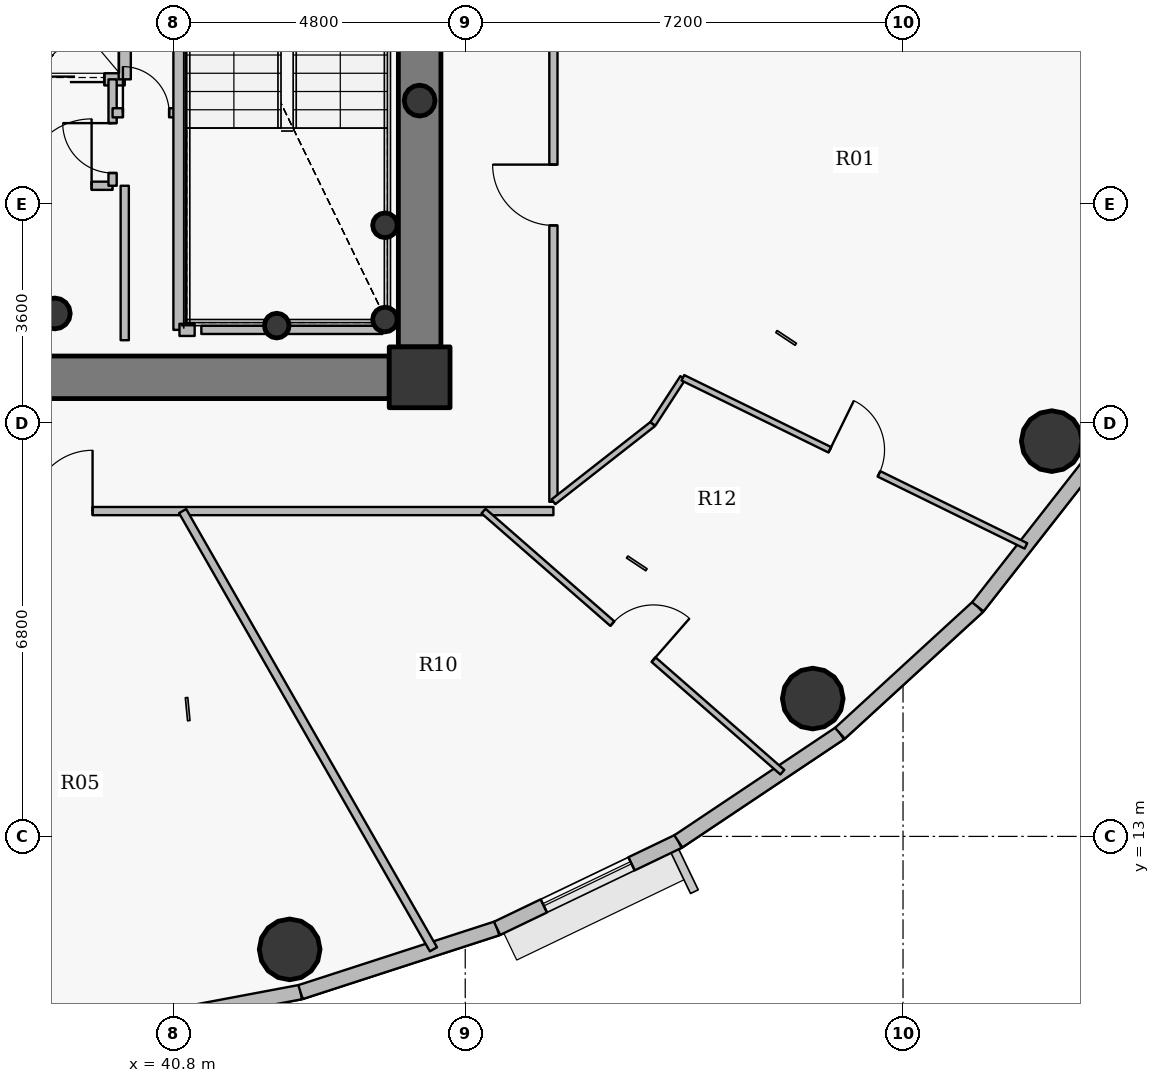
"""IFC4 building model, lengths in metres.
Left out: names, types, materials, properties, quantities, classifications, styles, units other than length and angle.
Written with IfcOpenShell. Run it as: python <this file> out.ifc"""

import sys

from ifc_helpers import new_model, si_unit, direction, frame, frame_2d, origin, origin_2d, place, context, subcontext, project, spatial, rectangle, hollow_circle, extrude, source, transform, mapped, element, fill, save


model = new_model("IFC4")
c1 = context("Model", 3, precision=1e-05, world=origin(), true_north=direction((0.0, 1.0)))
c2 = subcontext(c1, "Body", "Model", "MODEL_VIEW")
j1 = project(units=[si_unit("LENGTHUNIT", "METRE"), si_unit("PLANEANGLEUNIT", "RADIAN")], contexts=[c1])
p1 = place(None, origin())
s1 = spatial("IfcSite", under=j1, at=p1, CompositionType="ELEMENT")
p2 = place(p1, origin())
s2 = spatial("IfcBuilding", under=s1, at=p2, CompositionType="ELEMENT")
p3 = place(p2, frame((0.0, 0.0, 273.0)))
s3 = spatial("IfcBuildingStorey", under=s2, at=p3, CompositionType="ELEMENT", Elevation=273.0)
p4 = place(p3, frame((44.85, 20.55, 0.0), z_axis=(0.0, 0.0, 1.0), x_axis=(1.0, 0.0, 0.0)))
e1 = element("IfcColumn", 1, at=p4, inside=s3, PredefinedType="COLUMN", context=c2, shape_type="SweptSolid", body=[
    extrude(rectangle(XDim=1.0, YDim=1.0, at=origin_2d()), origin(), (0.0, 0.0, 1.0), 3.75),
])
p5 = place(p3, frame((38.85, 21.6, 0.0), z_axis=(0.0, 0.0, 1.0), x_axis=(1.0, 0.0, 0.0)))
e2 = element("IfcColumn", 2, at=p5, inside=s3, PredefinedType="COLUMN", context=c2, shape_type="SweptSolid", body=[
    extrude(hollow_circle(Radius=0.254, WallThickness=0.02, at=origin_2d()), origin(), (0.0, 0.0, 1.0), 3.75),
])
for number, where, z_axis, x_axis in (
    (3, (44.28, 21.5, 0.0), (0.0, 0.0, 1.0), (1.0, 0.0, 0.0)),
    (4, (44.28, 23.05, 0.0), (0.0, 0.0, 1.0), (1.0, 0.0, 0.0)),
    (5, (42.5, 21.4, 0.0), (0.0, 0.0, 1.0), (1.0, 0.0, 0.0)),
):
    element("IfcColumn", number, at=place(p3, frame(where, z_axis=z_axis, x_axis=x_axis)), inside=s3, PredefinedType="COLUMN", context=c2, shape_type="SweptSolid", body=[
        extrude(hollow_circle(Radius=0.203, WallThickness=0.016, at=origin_2d()), origin(), (0.0, 0.0, 1.0), 3.75),
    ])
p6 = place(p3, frame((44.85, 32.95, 0.0), z_axis=(0.0, 0.0, 1.0), x_axis=(0.0, -1.0, 0.0)))
e6 = element("IfcWall", 6, at=p6, inside=s3, PredefinedType="SHEAR", context=c2, shape_type="SweptSolid", body=[
    extrude(rectangle(XDim=11.9, YDim=0.7, at=frame_2d((5.95, 0.0))), origin(), (0.0, 0.0, 1.0), 3.05),
])
p7 = place(p3, frame((44.35, 20.55, 0.0), z_axis=(0.0, 0.0, 1.0), x_axis=(-1.0, 0.0, 0.0)))
e7 = element("IfcWall", 7, at=p7, inside=s3, PredefinedType="SHEAR", context=c2, shape_type="SweptSolid", body=[
    extrude(rectangle(XDim=16.7, YDim=0.7, at=frame_2d((8.35, 0.0))), origin(), (0.0, 0.0, 1.0), 3.05),
])
p8 = place(p7, frame((12.925, 0.0, 0.0)))
e8 = element("IfcOpeningElement", 8, at=p8, cuts=e7, PredefinedType="OPENING", context=c2, shape_type="SweptSolid", body=[
    extrude(rectangle(XDim=1.15, YDim=2.15, at=origin_2d()), frame((0.575, 0.36, 1.075), z_axis=(0.0, -1.0, 0.0), x_axis=(1.0, 0.0, 0.0)), (0.0, 0.0, 1.0), 0.72),
])
p9 = place(p7, frame((9.1, 0.0, 0.0)))
e9 = element("IfcOpeningElement", 9, at=p9, cuts=e7, PredefinedType="OPENING", context=c2, shape_type="SweptSolid", body=[
    extrude(rectangle(XDim=1.15, YDim=2.15, at=origin_2d()), frame((0.575, 0.36, 1.075), z_axis=(0.0, -1.0, 0.0), x_axis=(1.0, 0.0, 0.0)), (0.0, 0.0, 1.0), 0.72),
])
for number, where, z_axis, x_axis in (
    (10, (42.712, 11.142, 0.0), (0.0, 0.0, 1.0), (1.0, 0.0, 0.0)),
    (11, (51.315, 15.267, 0.0), (0.0, 0.0, 1.0), (1.0, 0.0, 0.0)),
    (12, (55.246, 19.5, 0.0), (0.0, 0.0, 1.0), (1.0, 0.0, 0.0)),
):
    element("IfcColumn", number, at=place(p3, frame(where, z_axis=z_axis, x_axis=x_axis)), inside=s3, PredefinedType="COLUMN", context=c2, shape_type="SweptSolid", body=[
        extrude(hollow_circle(Radius=0.5, WallThickness=0.032, at=origin_2d()), origin(), (0.0, 0.0, 1.0), 3.75),
    ])
p10 = place(p3, frame((44.85, 25.1, 0.0), z_axis=(0.0, 0.0, 1.0), x_axis=(1.0, 0.0, 0.0)))
e13 = element("IfcColumn", 13, at=p10, inside=s3, PredefinedType="COLUMN", context=c2, shape_type="SweptSolid", body=[
    extrude(hollow_circle(Radius=0.254, WallThickness=0.02, at=origin_2d()), origin(), (0.0, 0.0, 1.0), 3.75),
])
p11 = place(p3, frame((42.891, 10.44, 0.0), z_axis=(0.0, 0.0, 1.0), x_axis=(-0.982782655757, -0.184765395959, 0.0)))
e14 = element("IfcWall", 14, at=p11, inside=s3, PredefinedType="SOLIDWALL", context=c2, shape_type="SweptSolid", body=[
    extrude(rectangle(XDim=3.462, YDim=0.24, at=frame_2d((1.731, 0.0))), origin(), (0.0, 0.0, 1.0), 3.5),
])
p12 = place(p3, frame((46.123, 11.488, 0.0), z_axis=(0.0, 0.0, 1.0), x_axis=(-0.95123136723, -0.308478339592, 0.0)))
e15 = element("IfcWall", 15, at=p12, inside=s3, PredefinedType="SOLIDWALL", context=c2, shape_type="SweptSolid", body=[
    extrude(rectangle(XDim=3.398, YDim=0.24, at=frame_2d((1.699, 0.0))), origin(), (0.0, 0.0, 1.0), 3.5),
])
p13 = place(p3, frame((49.104, 12.918, 0.0), z_axis=(0.0, 0.0, 1.0), x_axis=(-0.901573741254, -0.43262546051, 0.0)))
e16 = element("IfcWall", 16, at=p13, inside=s3, PredefinedType="SOLIDWALL", context=c2, shape_type="SweptSolid", body=[
    extrude(rectangle(XDim=3.307, YDim=0.24, at=frame_2d((1.653, 0.0))), origin(), (0.0, 0.0, 1.0), 3.5),
])
p14 = place(p13, frame((0.854, 0.0, 0.9)))
e17 = element("IfcOpeningElement", 17, at=p14, cuts=e16, PredefinedType="OPENING", context=c2, shape_type="SweptSolid", body=[
    extrude(rectangle(XDim=1.6, YDim=1.75, at=origin_2d()), frame((0.8, 0.13, 0.875), z_axis=(0.0, -1.0, 0.0), x_axis=(1.0, 0.0, 0.0)), (0.0, 0.0, 1.0), 0.26),
])
p15 = place(p3, frame((51.762, 14.696, 0.0), z_axis=(0.0, 0.0, 1.0), x_axis=(-0.831250592635, -0.55589787933, 0.0)))
e18 = element("IfcWall", 18, at=p15, inside=s3, PredefinedType="SOLIDWALL", context=c2, shape_type="SweptSolid", body=[
    extrude(rectangle(XDim=3.197, YDim=0.24, at=frame_2d((1.599, 0.0))), origin(), (0.0, 0.0, 1.0), 3.5),
])
p16 = place(p3, frame((54.03, 16.775, 0.0), z_axis=(0.0, 0.0, 1.0), x_axis=(-0.737068506972, -0.675818034703, 0.0)))
e19 = element("IfcWall", 19, at=p16, inside=s3, PredefinedType="SOLIDWALL", context=c2, shape_type="SweptSolid", body=[
    extrude(rectangle(XDim=3.077, YDim=0.24, at=frame_2d((1.539, 0.0))), origin(), (0.0, 0.0, 1.0), 3.5),
])
p17 = place(p3, frame((55.854, 19.105, 0.0), z_axis=(0.0, 0.0, 1.0), x_axis=(-0.616337186556, -0.787482363275, 0.0)))
e20 = element("IfcWall", 20, at=p17, inside=s3, PredefinedType="SOLIDWALL", context=c2, shape_type="SweptSolid", body=[
    extrude(rectangle(XDim=2.958, YDim=0.24, at=frame_2d((1.479, 0.0))), origin(), (0.0, 0.0, 1.0), 3.5),
])
p18 = place(p3, frame((35.45, 23.7, 0.0), z_axis=(0.0, 0.0, 1.0), x_axis=(1.0, 0.0, 0.0)))
e21 = element("IfcWall", 21, at=p18, inside=s3, PredefinedType="PARTITIONING", context=c2, shape_type="SweptSolid", body=[
    extrude(rectangle(XDim=4.35, YDim=0.135, at=frame_2d((2.175, 0.0))), origin(), (0.0, 0.0, 1.0), 3.085),
])
p19 = place(p18, frame((2.905, 0.0, 0.0)))
e22 = element("IfcOpeningElement", 22, at=p19, cuts=e21, PredefinedType="OPENING", context=c2, shape_type="SweptSolid", body=[
    extrude(rectangle(XDim=1.1, YDim=2.15, at=origin_2d()), frame((0.55, 0.078, 1.075), z_axis=(0.0, -1.0, 0.0), x_axis=(1.0, 0.0, 0.0)), (0.0, 0.0, 1.0), 0.155),
])
p20 = place(p3, frame((35.45, 25.45, 0.0), z_axis=(0.0, 0.0, 1.0), x_axis=(1.0, 0.0, 0.0)))
e23 = element("IfcWall", 23, at=p20, inside=s3, PredefinedType="PARTITIONING", context=c2, shape_type="SweptSolid", body=[
    extrude(rectangle(XDim=4.55, YDim=0.2, at=frame_2d((2.275, 0.0))), origin(), (0.0, 0.0, 1.0), 3.085),
])
p21 = place(p20, frame((0.25, 0.0, 0.0)))
e24 = element("IfcOpeningElement", 24, at=p21, cuts=e23, PredefinedType="OPENING", context=c2, shape_type="SweptSolid", body=[
    extrude(rectangle(XDim=1.05, YDim=2.15, at=origin_2d()), frame((0.525, 0.11, 1.075), z_axis=(0.0, -1.0, 0.0), x_axis=(1.0, 0.0, 0.0)), (0.0, 0.0, 1.0), 0.22),
])
p22 = place(p20, frame((1.745, 0.0, 0.0)))
e25 = element("IfcOpeningElement", 25, at=p22, cuts=e23, PredefinedType="OPENING", context=c2, shape_type="SweptSolid", body=[
    extrude(rectangle(XDim=1.05, YDim=2.15, at=origin_2d()), frame((0.525, 0.11, 1.075), z_axis=(0.0, -1.0, 0.0), x_axis=(1.0, 0.0, 0.0)), (0.0, 0.0, 1.0), 0.22),
])
p23 = place(p20, frame((3.165, 0.0, 0.0)))
e26 = element("IfcOpeningElement", 26, at=p23, cuts=e23, PredefinedType="OPENING", context=c2, shape_type="SweptSolid", body=[
    extrude(rectangle(XDim=1.05, YDim=2.15, at=origin_2d()), frame((0.525, 0.11, 1.075), z_axis=(0.0, -1.0, 0.0), x_axis=(1.0, 0.0, 0.0)), (0.0, 0.0, 1.0), 0.22),
])
p24 = place(p3, frame((36.95, 18.35, 0.0), z_axis=(0.0, 0.0, 1.0), x_axis=(1.0, 0.0, 0.0)))
e27 = element("IfcWall", 27, at=p24, inside=s3, PredefinedType="PARTITIONING", context=c2, shape_type="SweptSolid", body=[
    extrude(rectangle(XDim=10.1, YDim=0.135, at=frame_2d((5.05, 0.0))), origin(), (0.0, 0.0, 1.0), 3.035),
])
p25 = place(p24, frame((1.521, 0.0, 0.0)))
e28 = element("IfcOpeningElement", 28, at=p25, cuts=e27, PredefinedType="OPENING", context=c2, shape_type="SweptSolid", body=[
    extrude(rectangle(XDim=1.0, YDim=2.15, at=origin_2d()), frame((0.5, 0.078, 1.075), z_axis=(0.0, -1.0, 0.0), x_axis=(1.0, 0.0, 0.0)), (0.0, 0.0, 1.0), 0.155),
])
p26 = place(p3, frame((39.8, 23.7, 0.0), z_axis=(0.0, 0.0, 1.0), x_axis=(0.0, 1.0, 0.0)))
e29 = element("IfcWall", 29, at=p26, inside=s3, PredefinedType="PARTITIONING", context=c2, shape_type="SweptSolid", body=[
    extrude(rectangle(XDim=1.75, YDim=0.135, at=frame_2d((0.875, 0.0))), origin(), (0.0, 0.0, 1.0), 3.5),
])
p27 = place(p26, frame((0.21, 0.0, 0.0)))
e30 = element("IfcOpeningElement", 30, at=p27, cuts=e29, PredefinedType="OPENING", context=c2, shape_type="SweptSolid", body=[
    extrude(rectangle(XDim=0.82, YDim=2.1, at=origin_2d()), frame((0.41, 0.078, 1.05), z_axis=(0.0, -1.0, 0.0), x_axis=(1.0, 0.0, 0.0)), (0.0, 0.0, 1.0), 0.155),
])
p28 = place(p3, frame((39.8, 24.9, 0.0), z_axis=(0.0, 0.0, 1.0), x_axis=(1.0, 0.0, 0.0)))
e31 = element("IfcWall", 31, at=p28, inside=s3, PredefinedType="PARTITIONING", context=c2, shape_type="SweptSolid", body=[
    extrude(rectangle(XDim=1.1, YDim=0.15, at=frame_2d((0.55, 0.0))), origin(), (0.0, 0.0, 1.0), 3.5),
])
p29 = place(p28, frame((0.17, 0.0, 0.0)))
e32 = element("IfcOpeningElement", 32, at=p29, cuts=e31, PredefinedType="OPENING", context=c2, shape_type="SweptSolid", body=[
    extrude(rectangle(XDim=0.76, YDim=2.1, at=origin_2d()), frame((0.38, 0.085, 1.05), z_axis=(0.0, -1.0, 0.0), x_axis=(1.0, 0.0, 0.0)), (0.0, 0.0, 1.0), 0.17),
])
p30 = place(p3, frame((40.0, 25.45, 0.0), z_axis=(0.0, 0.0, 1.0), x_axis=(0.0, 1.0, 0.0)))
e33 = element("IfcWall", 33, at=p30, inside=s3, PredefinedType="PARTITIONING", context=c2, shape_type="SweptSolid", body=[
    extrude(rectangle(XDim=4.4, YDim=0.2, at=frame_2d((2.2, 0.0))), origin(), (0.0, 0.0, 1.0), 3.5),
])
p31 = place(p3, frame((40.9, 21.33, 0.0), z_axis=(0.0, 0.0, 1.0), x_axis=(0.0, 1.0, 0.0)))
e34 = element("IfcWall", 34, at=p31, inside=s3, PredefinedType="PARTITIONING", context=c2, shape_type="SweptSolid", body=[
    extrude(rectangle(XDim=5.91, YDim=0.2, at=frame_2d((2.955, 0.0))), origin(), (0.0, 0.0, 1.0), 3.035),
])
p32 = place(p3, frame((40.9, 21.33, 0.0), z_axis=(0.0, 0.0, 1.0), x_axis=(1.0, 0.0, 0.0)))
e35 = element("IfcWall", 35, at=p32, inside=s3, PredefinedType="PARTITIONING", context=c2, shape_type="SweptSolid", body=[
    extrude(rectangle(XDim=0.25, YDim=0.2, at=frame_2d((0.125, 0.0))), origin(), (0.0, 0.0, 1.0), 3.035),
])
p33 = place(p3, frame((40.952, 18.35, 0.0), z_axis=(0.0, 0.0, 1.0), x_axis=(0.496803688517, -0.867862947173, 0.0)))
e36 = element("IfcWall", 36, at=p33, inside=s3, PredefinedType="PARTITIONING", context=c2, shape_type="SweptSolid", body=[
    extrude(rectangle(XDim=8.304, YDim=0.135, at=frame_2d((4.152, 0.0))), origin(), (0.0, 0.0, 1.0), 2.985),
])
p34 = place(p3, frame((45.901, 18.35, 0.0), z_axis=(0.0, 0.0, 1.0), x_axis=(0.753056223084, -0.657956172457, 0.0)))
e37 = element("IfcWall", 37, at=p34, inside=s3, PredefinedType="PARTITIONING", context=c2, shape_type="SweptSolid", body=[
    extrude(rectangle(XDim=6.526, YDim=0.1, at=frame_2d((3.263, 0.0))), origin(), (0.0, 0.0, 1.0), 2.985),
])
p35 = place(p34, frame((2.813, 0.0, 0.0)))
e38 = element("IfcOpeningElement", 38, at=p35, cuts=e37, PredefinedType="OPENING", context=c2, shape_type="SweptSolid", body=[
    extrude(rectangle(XDim=0.9, YDim=2.1, at=origin_2d()), frame((0.45, 0.06, 1.05), z_axis=(0.0, -1.0, 0.0), x_axis=(1.0, 0.0, 0.0)), (0.0, 0.0, 1.0), 0.12),
])
p36 = place(p3, frame((47.05, 18.503, 0.0), z_axis=(0.0, 0.0, 1.0), x_axis=(0.0, 1.0, 0.0)))
e39 = element("IfcWall", 39, at=p36, inside=s3, PredefinedType="PARTITIONING", context=c2, shape_type="SweptSolid", body=[
    extrude(rectangle(XDim=17.147, YDim=0.135, at=frame_2d((8.574, 0.0))), origin(), (0.0, 0.0, 1.0), 3.035),
])
p37 = place(p36, frame((4.545, 0.0, 0.0)))
e40 = element("IfcOpeningElement", 40, at=p37, cuts=e39, PredefinedType="OPENING", context=c2, shape_type="SweptSolid", body=[
    extrude(rectangle(XDim=1.0, YDim=2.15, at=origin_2d()), frame((0.5, 0.078, 1.075), z_axis=(0.0, -1.0, 0.0), x_axis=(1.0, 0.0, 0.0)), (0.0, 0.0, 1.0), 0.155),
])
p38 = place(p3, frame((47.05, 18.503, 0.0), z_axis=(0.0, 0.0, 1.0), x_axis=(0.787328855274, 0.616533270516, 0.0)))
e41 = element("IfcWall", 41, at=p38, inside=s3, PredefinedType="PARTITIONING", context=c2, shape_type="SweptSolid", body=[
    extrude(rectangle(XDim=2.077, YDim=0.1, at=frame_2d((1.039, 0.0))), origin(), (0.0, 0.0, 1.0), 3.035),
])
p39 = place(p3, frame((48.685, 19.783, 0.0), z_axis=(0.0, 0.0, 1.0), x_axis=(0.545519027777, 0.838098437138, 0.0)))
e42 = element("IfcWall", 42, at=p39, inside=s3, PredefinedType="PARTITIONING", context=c2, shape_type="SweptSolid", body=[
    extrude(rectangle(XDim=0.905, YDim=0.1, at=frame_2d((0.453, 0.0))), origin(), (0.0, 0.0, 1.0), 3.5),
])
p40 = place(p3, frame((49.179, 20.542, 0.0), z_axis=(0.0, 0.0, 1.0), x_axis=(0.89799659679, -0.440002400167, 0.0)))
e43 = element("IfcWall", 43, at=p40, inside=s3, PredefinedType="PARTITIONING", context=c2, shape_type="SweptSolid", body=[
    extrude(rectangle(XDim=6.283, YDim=0.1, at=frame_2d((3.141, 0.0))), origin(), (0.0, 0.0, 1.0), 2.985),
])
p41 = place(p40, frame((2.691, 0.0, 0.0)))
e44 = element("IfcOpeningElement", 44, at=p41, cuts=e43, PredefinedType="OPENING", context=c2, shape_type="SweptSolid", body=[
    extrude(rectangle(XDim=0.9, YDim=2.1, at=origin_2d()), frame((0.45, 0.06, 1.05), z_axis=(0.0, -1.0, 0.0), x_axis=(1.0, 0.0, 0.0)), (0.0, 0.0, 1.0), 0.12),
])
p42 = place(p3, frame((44.24, 21.33, 0.0), z_axis=(0.0, 0.0, 1.0), x_axis=(-1.0, 0.0, 0.0)))
e45 = element("IfcWall", 45, at=p42, inside=s3, PredefinedType="PARTITIONING", context=c2, shape_type="SweptSolid", body=[
    extrude(rectangle(XDim=2.98, YDim=0.135, at=frame_2d((1.49, 0.0))), origin(), (0.0, 0.0, 1.0), 3.035),
])
p43 = place(p3, frame((40.0, 23.7, 0.0), z_axis=(0.0, 0.0, 1.0), x_axis=(0.0, -1.0, 0.0)))
e46 = element("IfcWall", 46, at=p43, inside=s3, PredefinedType="PARTITIONING", context=c2, shape_type="SweptSolid", body=[
    extrude(rectangle(XDim=2.54, YDim=0.135, at=frame_2d((1.27, 0.0))), origin(), (0.0, 0.0, 1.0), 3.035),
])
p44 = place(p3, frame((44.36, 20.2, 0.0), z_axis=(0.0, 0.0, 1.0), x_axis=(1.0, 0.0, 0.0)))
e47 = element("IfcWall", 47, at=p44, inside=s3, PredefinedType="PARTITIONING", context=c2, shape_type="SweptSolid", body=[
    extrude(rectangle(XDim=0.84, YDim=0.135, at=frame_2d((0.42, 0.0))), origin(), (0.0, 0.0, 1.0), 3.035),
])
p45 = place(p3, frame((45.2, 20.508, 0.0), z_axis=(0.0, 0.0, 1.0), x_axis=(0.0, 1.0, 0.0)))
e48 = element("IfcWall", 48, at=p45, inside=s3, PredefinedType="PARTITIONING", context=c2, shape_type="SweptSolid", body=[
    extrude(rectangle(XDim=0.532, YDim=0.135, at=frame_2d((0.266, 0.0))), origin(), (0.0, 0.0, 1.0), 3.5),
])
m1 = source(origin(), c2, "Body", "SweptSolid", [
    extrude(rectangle(XDim=1.6, YDim=1.75, at=origin_2d()), frame((0.8, 0.03, 0.875), z_axis=(0.0, -1.0, 0.0), x_axis=(1.0, 0.0, 0.0)), (0.0, 0.0, 1.0), 0.06),
])
p46 = place(p14, origin())
e49 = element("IfcWindow", 49, at=p46, inside=s3, PartitioningType="DOUBLE_PANEL_VERTICAL", PredefinedType="WINDOW", context=c2, shape_type="MappedRepresentation", body=[
    mapped(m1, transform((0.0, 0.0, 0.0), x_axis=(1.0, 0.0, 0.0), y_axis=(0.0, 1.0, 0.0), z_axis=(0.0, 0.0, 1.0), scale=1.0)),
])
fill(e17, e49)
m2 = source(origin(), c2, "Body", "SweptSolid", [
    extrude(rectangle(XDim=1.05, YDim=2.15, at=origin_2d()), frame((0.525, 0.025, 1.075), z_axis=(0.0, -1.0, 0.0), x_axis=(1.0, 0.0, 0.0)), (0.0, 0.0, 1.0), 0.05),
])
p47 = place(p23, origin())
e50 = element("IfcDoor", 50, at=p47, inside=s3, OperationType="DOUBLE_DOOR_SLIDING", PredefinedType="USERDEFINED", context=c2, shape_type="MappedRepresentation", body=[
    mapped(m2, transform((0.0, 0.0, 0.0), x_axis=(1.0, 0.0, 0.0), y_axis=(0.0, 1.0, 0.0), z_axis=(0.0, 0.0, 1.0), scale=1.0)),
])
fill(e26, e50)
m3 = source(origin(), c2, "Body", "SweptSolid", [
    extrude(rectangle(XDim=1.0, YDim=2.15, at=origin_2d()), frame((0.5, 0.025, 1.075), z_axis=(0.0, -1.0, 0.0), x_axis=(1.0, 0.0, 0.0)), (0.0, 0.0, 1.0), 0.05),
])
p48 = place(p25, origin())
e51 = element("IfcDoor", 51, at=p48, inside=s3, OperationType="SINGLE_SWING_RIGHT", PredefinedType="DOOR", context=c2, shape_type="MappedRepresentation", body=[
    mapped(m3, transform((0.0, 0.0, 0.0), x_axis=(1.0, 0.0, 0.0), y_axis=(0.0, 1.0, 0.0), z_axis=(0.0, 0.0, 1.0), scale=1.0)),
])
fill(e28, e51)
p49 = place(p37, origin())
e52 = element("IfcDoor", 52, at=p49, inside=s3, OperationType="SINGLE_SWING_RIGHT", PredefinedType="DOOR", context=c2, shape_type="MappedRepresentation", body=[
    mapped(m3, transform((0.0, 0.0, 0.0), x_axis=(1.0, 0.0, 0.0), y_axis=(0.0, 1.0, 0.0), z_axis=(0.0, 0.0, 1.0), scale=1.0)),
])
fill(e40, e52)
m4 = source(origin(), c2, "Body", "SweptSolid", [
    extrude(rectangle(XDim=0.9, YDim=2.1, at=origin_2d()), frame((0.45, 0.025, 1.05), z_axis=(0.0, -1.0, 0.0), x_axis=(1.0, 0.0, 0.0)), (0.0, 0.0, 1.0), 0.05),
])
p50 = place(p41, origin())
e53 = element("IfcDoor", 53, at=p50, inside=s3, OperationType="SINGLE_SWING_LEFT", PredefinedType="DOOR", context=c2, shape_type="MappedRepresentation", body=[
    mapped(m4, transform((0.0, 0.0, 0.0), x_axis=(1.0, 0.0, 0.0), y_axis=(0.0, 1.0, 0.0), z_axis=(0.0, 0.0, 1.0), scale=1.0)),
])
fill(e44, e53)
p51 = place(p35, origin())
e54 = element("IfcDoor", 54, at=p51, inside=s3, OperationType="SINGLE_SWING_RIGHT", PredefinedType="DOOR", context=c2, shape_type="MappedRepresentation", body=[
    mapped(m4, transform((0.0, 0.0, 0.0), x_axis=(1.0, 0.0, 0.0), y_axis=(0.0, 1.0, 0.0), z_axis=(0.0, 0.0, 1.0), scale=1.0)),
])
fill(e38, e54)
m5 = source(origin(), c2, "Body", "SweptSolid", [
    extrude(rectangle(XDim=1.1, YDim=2.15, at=origin_2d()), frame((0.55, 0.025, 1.075), z_axis=(0.0, -1.0, 0.0), x_axis=(1.0, 0.0, 0.0)), (0.0, 0.0, 1.0), 0.05),
])
p52 = place(p19, origin())
e55 = element("IfcDoor", 55, at=p52, inside=s3, OperationType="SINGLE_SWING_RIGHT", PredefinedType="DOOR", context=c2, shape_type="MappedRepresentation", body=[
    mapped(m5, transform((0.0, 0.0, 0.0), x_axis=(1.0, 0.0, 0.0), y_axis=(0.0, 1.0, 0.0), z_axis=(0.0, 0.0, 1.0), scale=1.0)),
])
fill(e22, e55)
m6 = source(origin(), c2, "Body", "SweptSolid", [
    extrude(rectangle(XDim=0.82, YDim=2.1, at=origin_2d()), frame((0.41, 0.025, 1.05), z_axis=(0.0, -1.0, 0.0), x_axis=(1.0, 0.0, 0.0)), (0.0, 0.0, 1.0), 0.05),
])
p53 = place(p27, origin())
e56 = element("IfcDoor", 56, at=p53, inside=s3, OperationType="SINGLE_SWING_RIGHT", PredefinedType="DOOR", context=c2, shape_type="MappedRepresentation", body=[
    mapped(m6, transform((0.0, 0.0, 0.0), x_axis=(1.0, 0.0, 0.0), y_axis=(0.0, 1.0, 0.0), z_axis=(0.0, 0.0, 1.0), scale=1.0)),
])
fill(e30, e56)
m7 = source(origin(), c2, "Body", "SweptSolid", [
    extrude(rectangle(XDim=0.76, YDim=2.1, at=origin_2d()), frame((0.38, 0.025, 1.05), z_axis=(0.0, -1.0, 0.0), x_axis=(1.0, 0.0, 0.0)), (0.0, 0.0, 1.0), 0.05),
])
p54 = place(p29, origin())
e57 = element("IfcDoor", 57, at=p54, inside=s3, OperationType="SINGLE_SWING_LEFT", PredefinedType="DOOR", context=c2, shape_type="MappedRepresentation", body=[
    mapped(m7, transform((0.0, 0.0, 0.0), x_axis=(1.0, 0.0, 0.0), y_axis=(0.0, 1.0, 0.0), z_axis=(0.0, 0.0, 1.0), scale=1.0)),
])
fill(e32, e57)
save(model, sys.argv[1])
